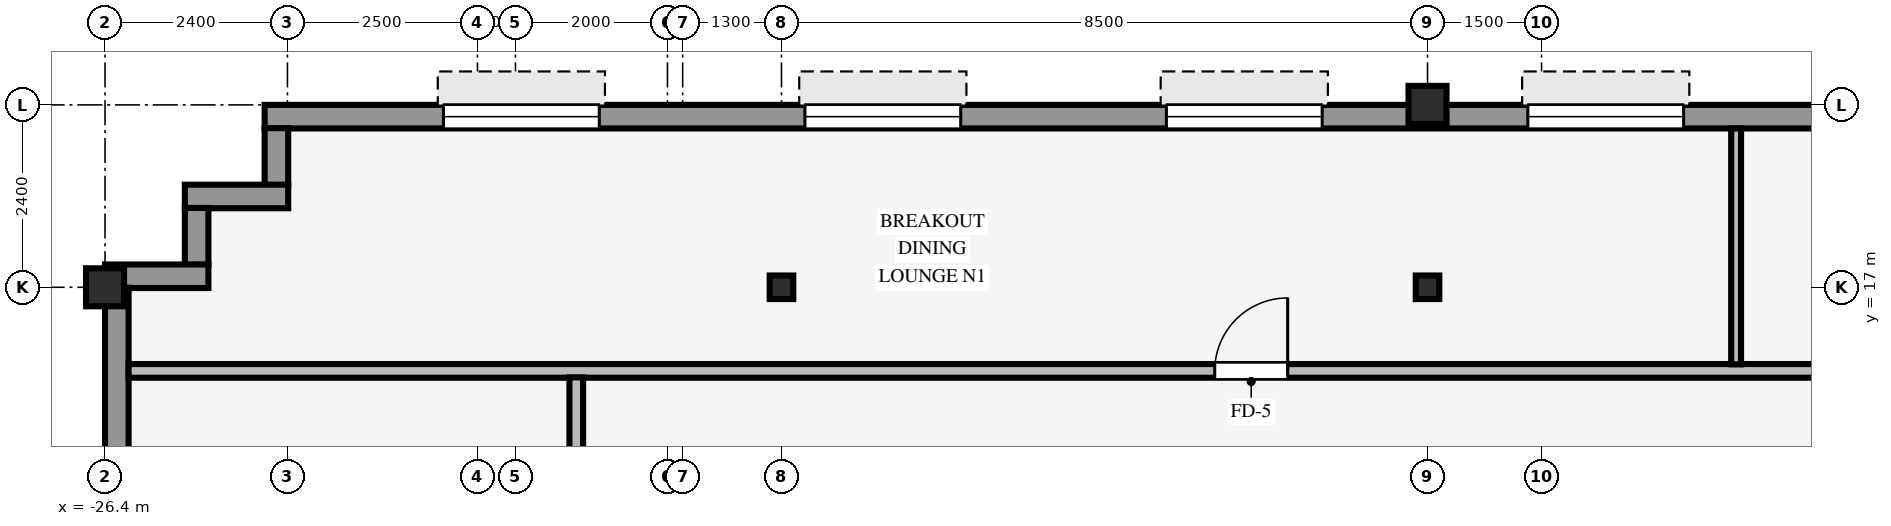
"""IFC4 building model, lengths in metres.
Left out: names, types, materials, properties, quantities, classifications, styles, units other than length and angle.
Written with IfcOpenShell. Run it as: python <this file> out.ifc"""

import sys

from ifc_helpers import new_model, si_unit, direction, frame, frame_2d, origin, origin_2d, place, context, subcontext, project, spatial, rectangle, hollow_rectangle, i_section, extrude, source, transform, mapped, element, fill, save


model = new_model("IFC4")
c1 = context("Model", 3, precision=1e-05, world=origin(), true_north=direction((0.0, 1.0)))
c2 = subcontext(c1, "Body", "Model", "MODEL_VIEW")
j1 = project(units=[si_unit("LENGTHUNIT", "METRE"), si_unit("PLANEANGLEUNIT", "RADIAN")], contexts=[c1])
p1 = place(None, origin())
s1 = spatial("IfcSite", under=j1, at=p1, CompositionType="ELEMENT")
p2 = place(p1, origin())
s2 = spatial("IfcBuilding", under=s1, at=p2, CompositionType="ELEMENT")
p3 = place(p2, frame((0.0, 0.0, 198.2)))
s3 = spatial("IfcBuildingStorey", under=s2, at=p3, CompositionType="ELEMENT", Elevation=198.2)
for number, where, z_axis, x_axis in (
    (1, (-26.4, 17.0, 0.0), (0.0, 0.0, 1.0), (1.0, 0.0, 0.0)),
    (2, (-9.0, 19.4, 0.0), (0.0, 0.0, 1.0), (1.0, 0.0, 0.0)),
):
    element("IfcColumn", number, at=place(p3, frame(where, z_axis=z_axis, x_axis=x_axis)), inside=s3, PredefinedType="COLUMN", context=c2, shape_type="SweptSolid", body=[
        extrude(hollow_rectangle(XDim=0.5, YDim=0.5, WallThickness=0.032, InnerFilletRadius=0.032, OuterFilletRadius=0.064, at=origin_2d()), origin(), (0.0, 0.0, 1.0), 3.37),
    ])
for number, where, z_axis, x_axis in (
    (3, (-17.5, 17.0, 0.0), (0.0, 0.0, 1.0), (1.0, 0.0, 0.0)),
    (4, (-9.0, 17.0, 0.0), (0.0, 0.0, 1.0), (1.0, 0.0, 0.0)),
):
    element("IfcColumn", number, at=place(p3, frame(where, z_axis=z_axis, x_axis=x_axis)), inside=s3, PredefinedType="COLUMN", context=c2, shape_type="SweptSolid", body=[
        extrude(i_section(OverallWidth=0.31, OverallDepth=0.31, WebThickness=0.015, FlangeThickness=0.015, FilletRadius=0.015, at=origin_2d()), origin(), (0.0, 0.0, 1.0), 3.37),
    ])
p4 = place(p3, frame((-24.3, 19.245, 0.0), z_axis=(0.0, 0.0, 1.0), x_axis=(1.0, 0.0, 0.0)))
e5 = element("IfcWall", 5, at=p4, inside=s3, PredefinedType="STANDARD", context=c2, shape_type="SweptSolid", body=[
    extrude(rectangle(XDim=44.8, YDim=0.31, at=frame_2d((22.4, 0.0))), origin(), (0.0, 0.0, 1.0), 2.705),
])
p5 = place(p4, frame((2.353, 0.0, 0.8)))
e6 = element("IfcOpeningElement", 6, at=p5, cuts=e5, PredefinedType="OPENING", context=c2, shape_type="SweptSolid", body=[
    extrude(rectangle(XDim=2.05, YDim=1.52, at=frame_2d((1.025, 0.76))), frame((0.0, 0.165, 0.0), z_axis=(0.0, -1.0, 0.0), x_axis=(1.0, 0.0, 0.0)), (0.0, 0.0, 1.0), 0.33),
])
p6 = place(p4, frame((7.108, 0.0, 0.8)))
e7 = element("IfcOpeningElement", 7, at=p6, cuts=e5, PredefinedType="OPENING", context=c2, shape_type="SweptSolid", body=[
    extrude(rectangle(XDim=2.05, YDim=1.52, at=frame_2d((1.025, 0.76))), frame((0.0, 0.165, 0.0), z_axis=(0.0, -1.0, 0.0), x_axis=(1.0, 0.0, 0.0)), (0.0, 0.0, 1.0), 0.33),
])
p7 = place(p4, frame((11.864, 0.0, 0.8)))
e8 = element("IfcOpeningElement", 8, at=p7, cuts=e5, PredefinedType="OPENING", context=c2, shape_type="SweptSolid", body=[
    extrude(rectangle(XDim=2.05, YDim=1.52, at=frame_2d((1.025, 0.76))), frame((0.0, 0.165, 0.0), z_axis=(0.0, -1.0, 0.0), x_axis=(1.0, 0.0, 0.0)), (0.0, 0.0, 1.0), 0.33),
])
p8 = place(p4, frame((16.619, 0.0, 0.8)))
e9 = element("IfcOpeningElement", 9, at=p8, cuts=e5, PredefinedType="OPENING", context=c2, shape_type="SweptSolid", body=[
    extrude(rectangle(XDim=2.05, YDim=1.52, at=frame_2d((1.025, 0.76))), frame((0.0, 0.165, 0.0), z_axis=(0.0, -1.0, 0.0), x_axis=(1.0, 0.0, 0.0)), (0.0, 0.0, 1.0), 0.33),
])
p9 = place(p4, frame((21.375, 0.0, 0.8)))
e10 = element("IfcOpeningElement", 10, at=p9, cuts=e5, PredefinedType="OPENING", context=c2, shape_type="SweptSolid", body=[
    extrude(rectangle(XDim=2.05, YDim=1.52, at=frame_2d((1.025, 0.76))), frame((0.0, 0.165, 0.0), z_axis=(0.0, -1.0, 0.0), x_axis=(1.0, 0.0, 0.0)), (0.0, 0.0, 1.0), 0.33),
])
p10 = place(p4, frame((26.131, 0.0, 0.8)))
e11 = element("IfcOpeningElement", 11, at=p10, cuts=e5, PredefinedType="OPENING", context=c2, shape_type="SweptSolid", body=[
    extrude(rectangle(XDim=2.05, YDim=1.52, at=frame_2d((1.025, 0.76))), frame((0.0, 0.165, 0.0), z_axis=(0.0, -1.0, 0.0), x_axis=(1.0, 0.0, 0.0)), (0.0, 0.0, 1.0), 0.33),
])
p11 = place(p4, frame((30.436, 0.0, 0.8)))
e12 = element("IfcOpeningElement", 12, at=p11, cuts=e5, PredefinedType="OPENING", context=c2, shape_type="SweptSolid", body=[
    extrude(rectangle(XDim=2.05, YDim=1.52, at=frame_2d((1.025, 0.76))), frame((0.0, 0.165, 0.0), z_axis=(0.0, -1.0, 0.0), x_axis=(1.0, 0.0, 0.0)), (0.0, 0.0, 1.0), 0.33),
])
p12 = place(p4, frame((35.642, 0.0, 0.8)))
e13 = element("IfcOpeningElement", 13, at=p12, cuts=e5, PredefinedType="OPENING", context=c2, shape_type="SweptSolid", body=[
    extrude(rectangle(XDim=2.05, YDim=1.52, at=frame_2d((1.025, 0.76))), frame((0.0, 0.165, 0.0), z_axis=(0.0, -1.0, 0.0), x_axis=(1.0, 0.0, 0.0)), (0.0, 0.0, 1.0), 0.33),
])
p13 = place(p4, frame((40.397, 0.0, 0.8)))
e14 = element("IfcOpeningElement", 14, at=p13, cuts=e5, PredefinedType="OPENING", context=c2, shape_type="SweptSolid", body=[
    extrude(rectangle(XDim=2.05, YDim=1.52, at=frame_2d((1.025, 0.76))), frame((0.0, 0.165, 0.0), z_axis=(0.0, -1.0, 0.0), x_axis=(1.0, 0.0, 0.0)), (0.0, 0.0, 1.0), 0.33),
])
p14 = place(p3, frame((-24.145, 18.346, 0.0), z_axis=(0.0, 0.0, 1.0), x_axis=(0.0, 1.0, 0.0)))
e15 = element("IfcWall", 15, at=p14, inside=s3, PredefinedType="STANDARD", context=c2, shape_type="SweptSolid", body=[
    extrude(rectangle(XDim=0.748, YDim=0.31, at=frame_2d((0.374, 0.0))), origin(), (0.0, 0.0, 1.0), 2.816),
])
p15 = place(p3, frame((-25.35, 18.195, 0.0), z_axis=(0.0, 0.0, 1.0), x_axis=(1.0, 0.0, 0.0)))
e16 = element("IfcWall", 16, at=p15, inside=s3, PredefinedType="STANDARD", context=c2, shape_type="SweptSolid", body=[
    extrude(rectangle(XDim=1.36, YDim=0.31, at=frame_2d((0.68, 0.0))), origin(), (0.0, 0.0, 1.0), 2.816),
])
p16 = place(p3, frame((-25.195, 17.296, 0.0), z_axis=(0.0, 0.0, 1.0), x_axis=(0.0, 1.0, 0.0)))
e17 = element("IfcWall", 17, at=p16, inside=s3, PredefinedType="STANDARD", context=c2, shape_type="SweptSolid", body=[
    extrude(rectangle(XDim=0.748, YDim=0.31, at=frame_2d((0.374, 0.0))), origin(), (0.0, 0.0, 1.0), 2.816),
])
p17 = place(p3, frame((-26.4, 17.145, 0.0), z_axis=(0.0, 0.0, 1.0), x_axis=(1.0, 0.0, 0.0)))
e18 = element("IfcWall", 18, at=p17, inside=s3, PredefinedType="STANDARD", context=c2, shape_type="SweptSolid", body=[
    extrude(rectangle(XDim=1.36, YDim=0.31, at=frame_2d((0.68, 0.0))), origin(), (0.0, 0.0, 1.0), 2.816),
])
p18 = place(p3, frame((-26.245, -20.794, 0.0), z_axis=(0.0, 0.0, 1.0), x_axis=(0.0, 1.0, 0.0)))
e19 = element("IfcWall", 19, at=p18, inside=s3, PredefinedType="STANDARD", context=c2, shape_type="SweptSolid", body=[
    extrude(rectangle(XDim=37.788, YDim=0.31, at=frame_2d((18.894, 0.0))), origin(), (0.0, 0.0, 1.0), 2.705),
])
p19 = place(p18, frame((24.744, 0.0, 0.0)))
e20 = element("IfcOpeningElement", 20, at=p19, cuts=e19, PredefinedType="OPENING", context=c2, shape_type="SweptSolid", body=[
    extrude(rectangle(XDim=1.05, YDim=2.1, at=frame_2d((0.525, 1.05))), frame((0.0, 0.165, 0.0), z_axis=(0.0, -1.0, 0.0), x_axis=(1.0, 0.0, 0.0)), (0.0, 0.0, 1.0), 0.33),
])
p20 = place(p18, frame((1.581, 0.0, 0.8)))
e21 = element("IfcOpeningElement", 21, at=p20, cuts=e19, PredefinedType="OPENING", context=c2, shape_type="SweptSolid", body=[
    extrude(rectangle(XDim=1.25, YDim=1.52, at=frame_2d((0.625, 0.76))), frame((0.0, 0.165, 0.0), z_axis=(0.0, -1.0, 0.0), x_axis=(1.0, 0.0, 0.0)), (0.0, 0.0, 1.0), 0.33),
])
p21 = place(p18, frame((8.044, 0.0, 0.8)))
e22 = element("IfcOpeningElement", 22, at=p21, cuts=e19, PredefinedType="OPENING", context=c2, shape_type="SweptSolid", body=[
    extrude(rectangle(XDim=1.25, YDim=1.52, at=frame_2d((0.625, 0.76))), frame((0.0, 0.165, 0.0), z_axis=(0.0, -1.0, 0.0), x_axis=(1.0, 0.0, 0.0)), (0.0, 0.0, 1.0), 0.33),
])
p22 = place(p18, frame((13.156, 0.0, 0.8)))
e23 = element("IfcOpeningElement", 23, at=p22, cuts=e19, PredefinedType="OPENING", context=c2, shape_type="SweptSolid", body=[
    extrude(rectangle(XDim=1.25, YDim=1.52, at=frame_2d((0.625, 0.76))), frame((0.0, 0.165, 0.0), z_axis=(0.0, -1.0, 0.0), x_axis=(1.0, 0.0, 0.0)), (0.0, 0.0, 1.0), 0.33),
])
p23 = place(p18, frame((18.269, 0.0, 0.8)))
e24 = element("IfcOpeningElement", 24, at=p23, cuts=e19, PredefinedType="OPENING", context=c2, shape_type="SweptSolid", body=[
    extrude(rectangle(XDim=1.25, YDim=1.52, at=frame_2d((0.625, 0.76))), frame((0.0, 0.165, 0.0), z_axis=(0.0, -1.0, 0.0), x_axis=(1.0, 0.0, 0.0)), (0.0, 0.0, 1.0), 0.33),
])
p24 = place(p18, frame((22.932, 0.0, 0.8)))
e25 = element("IfcOpeningElement", 25, at=p24, cuts=e19, PredefinedType="OPENING", context=c2, shape_type="SweptSolid", body=[
    extrude(rectangle(XDim=1.25, YDim=1.52, at=frame_2d((0.625, 0.76))), frame((0.0, 0.165, 0.0), z_axis=(0.0, -1.0, 0.0), x_axis=(1.0, 0.0, 0.0)), (0.0, 0.0, 1.0), 0.33),
])
p25 = place(p18, frame((28.044, 0.0, 0.8)))
e26 = element("IfcOpeningElement", 26, at=p25, cuts=e19, PredefinedType="OPENING", context=c2, shape_type="SweptSolid", body=[
    extrude(rectangle(XDim=1.25, YDim=1.52, at=frame_2d((0.625, 0.76))), frame((0.0, 0.165, 0.0), z_axis=(0.0, -1.0, 0.0), x_axis=(1.0, 0.0, 0.0)), (0.0, 0.0, 1.0), 0.33),
])
p26 = place(p18, frame((33.607, 0.0, 0.8)))
e27 = element("IfcOpeningElement", 27, at=p26, cuts=e19, PredefinedType="OPENING", context=c2, shape_type="SweptSolid", body=[
    extrude(rectangle(XDim=1.25, YDim=1.52, at=frame_2d((0.625, 0.76))), frame((0.0, 0.165, 0.0), z_axis=(0.0, -1.0, 0.0), x_axis=(1.0, 0.0, 0.0)), (0.0, 0.0, 1.0), 0.33),
])
p27 = place(p3, frame((-26.09, 15.9, 0.0), z_axis=(0.0, 0.0, 1.0), x_axis=(1.0, 0.0, 0.0)))
e28 = element("IfcWall", 28, at=p27, inside=s3, PredefinedType="PARTITIONING", context=c2, shape_type="SweptSolid", body=[
    extrude(rectangle(XDim=48.38, YDim=0.18, at=frame_2d((24.19, 0.0))), origin(), (0.0, 0.0, 1.0), 3.36),
])
p28 = place(p27, frame((14.29, 0.0, 0.0)))
e29 = element("IfcOpeningElement", 29, at=p28, cuts=e28, PredefinedType="OPENING", context=c2, shape_type="SweptSolid", body=[
    extrude(rectangle(XDim=0.96, YDim=2.1, at=frame_2d((0.48, 1.05))), frame((0.0, 0.1, 0.0), z_axis=(0.0, -1.0, 0.0), x_axis=(1.0, 0.0, 0.0)), (0.0, 0.0, 1.0), 0.2),
])
p29 = place(p27, frame((40.51, 0.0, 0.0)))
e30 = element("IfcOpeningElement", 30, at=p29, cuts=e28, PredefinedType="OPENING", context=c2, shape_type="SweptSolid", body=[
    extrude(rectangle(XDim=0.96, YDim=2.1, at=frame_2d((0.48, 1.05))), frame((0.0, 0.1, 0.0), z_axis=(0.0, -1.0, 0.0), x_axis=(1.0, 0.0, 0.0)), (0.0, 0.0, 1.0), 0.2),
])
p30 = place(p3, frame((-20.2, -15.814, 0.0), z_axis=(0.0, 0.0, 1.0), x_axis=(0.0, 1.0, 0.0)))
e31 = element("IfcWall", 31, at=p30, inside=s3, PredefinedType="PARTITIONING", context=c2, shape_type="SweptSolid", body=[
    extrude(rectangle(XDim=31.628, YDim=0.18, at=frame_2d((15.814, 0.0))), origin(), (0.0, 0.0, 1.0), 3.36),
])
p31 = place(p30, frame((15.334, 0.0, 0.0)))
e32 = element("IfcOpeningElement", 32, at=p31, cuts=e31, PredefinedType="OPENING", context=c2, shape_type="SweptSolid", body=[
    extrude(rectangle(XDim=0.96, YDim=2.1, at=frame_2d((0.48, 1.05))), frame((0.0, 0.1, 0.0), z_axis=(0.0, -1.0, 0.0), x_axis=(1.0, 0.0, 0.0)), (0.0, 0.0, 1.0), 0.2),
])
p32 = place(p30, frame((5.834, 0.0, 0.0)))
e33 = element("IfcOpeningElement", 33, at=p32, cuts=e31, PredefinedType="OPENING", context=c2, shape_type="SweptSolid", body=[
    extrude(rectangle(XDim=0.96, YDim=2.1, at=frame_2d((0.48, 1.05))), frame((0.0, 0.1, 0.0), z_axis=(0.0, -1.0, 0.0), x_axis=(1.0, 0.0, 0.0)), (0.0, 0.0, 1.0), 0.2),
])
p33 = place(p30, frame((24.834, 0.0, 0.0)))
e34 = element("IfcOpeningElement", 34, at=p33, cuts=e31, PredefinedType="OPENING", context=c2, shape_type="SweptSolid", body=[
    extrude(rectangle(XDim=0.96, YDim=2.1, at=frame_2d((0.48, 1.05))), frame((0.0, 0.1, 0.0), z_axis=(0.0, -1.0, 0.0), x_axis=(1.0, 0.0, 0.0)), (0.0, 0.0, 1.0), 0.2),
])
p34 = place(p3, frame((-4.94, 15.986, 0.0), z_axis=(0.0, 0.0, 1.0), x_axis=(0.0, 1.0, 0.0)))
e35 = element("IfcWall", 35, at=p34, inside=s3, PredefinedType="PARTITIONING", context=c2, shape_type="SweptSolid", body=[
    extrude(rectangle(XDim=3.104, YDim=0.13, at=frame_2d((1.552, 0.0))), origin(), (0.0, 0.0, 1.0), 3.36),
])
m1 = source(origin(), c2, "Body", "SweptSolid", [
    extrude(rectangle(XDim=2.05, YDim=1.52, at=frame_2d((1.025, 0.76))), frame((0.0, 0.03, 0.0), z_axis=(0.0, -1.0, 0.0), x_axis=(1.0, 0.0, 0.0)), (0.0, 0.0, 1.0), 0.06),
])
p35 = place(p5, origin())
e36 = element("IfcWindow", 36, at=p35, inside=s3, PartitioningType="SINGLE_PANEL", PredefinedType="WINDOW", context=c2, shape_type="MappedRepresentation", body=[
    mapped(m1, transform((0.0, 0.0, 0.0), scale=1.0)),
])
fill(e6, e36)
p36 = place(p6, origin())
e37 = element("IfcWindow", 37, at=p36, inside=s3, PartitioningType="SINGLE_PANEL", PredefinedType="WINDOW", context=c2, shape_type="MappedRepresentation", body=[
    mapped(m1, transform((0.0, 0.0, 0.0), scale=1.0)),
])
fill(e7, e37)
p37 = place(p7, origin())
e38 = element("IfcWindow", 38, at=p37, inside=s3, PartitioningType="SINGLE_PANEL", PredefinedType="WINDOW", context=c2, shape_type="MappedRepresentation", body=[
    mapped(m1, transform((0.0, 0.0, 0.0), scale=1.0)),
])
fill(e8, e38)
p38 = place(p8, origin())
e39 = element("IfcWindow", 39, at=p38, inside=s3, PartitioningType="SINGLE_PANEL", PredefinedType="WINDOW", context=c2, shape_type="MappedRepresentation", body=[
    mapped(m1, transform((0.0, 0.0, 0.0), scale=1.0)),
])
fill(e9, e39)
m2 = source(origin(), c2, "Body", "SweptSolid", [
    extrude(rectangle(XDim=0.96, YDim=2.1, at=frame_2d((0.48, 1.05))), frame((0.0, 0.025, 0.0), z_axis=(0.0, -1.0, 0.0), x_axis=(1.0, 0.0, 0.0)), (0.0, 0.0, 1.0), 0.05),
])
p39 = place(p28, origin())
e40 = element("IfcDoor", 40, at=p39, inside=s3, OperationType="SINGLE_SWING_RIGHT", PredefinedType="DOOR", context=c2, shape_type="MappedRepresentation", body=[
    mapped(m2, transform((0.0, 0.0, 0.0), scale=1.0)),
])
fill(e29, e40)
save(model, sys.argv[1])
